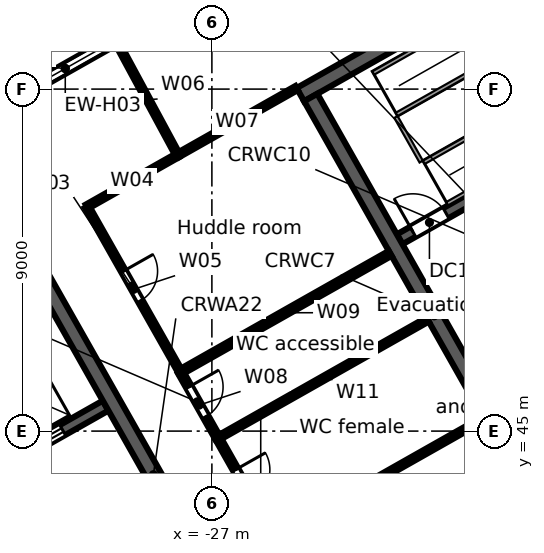
"""IFC4 building model, lengths in metres.
Left out: names, types, materials, properties, quantities, classifications, styles, units other than length and angle.
Written with IfcOpenShell. Run it as: python <this file> out.ifc"""

import sys

from ifc_helpers import new_model, si_unit, direction, frame, frame_2d, origin, place, context, subcontext, project, spatial, rectangle, extrude, element, fill, save


model = new_model("IFC4")
c1 = context("Model", 3, precision=1e-05, world=origin(), true_north=direction((0.0, 1.0)))
c2 = subcontext(c1, "Body", "Model", "MODEL_VIEW")
j1 = project(units=[si_unit("LENGTHUNIT", "METRE"), si_unit("PLANEANGLEUNIT", "RADIAN")], contexts=[c1])
p1 = place(None, origin())
s1 = spatial("IfcSite", under=j1, at=p1, CompositionType="ELEMENT")
p2 = place(p1, origin())
s2 = spatial("IfcBuilding", under=s1, at=p2, CompositionType="ELEMENT")
p3 = place(p2, frame((0.0, 0.0, 277.9)))
s3 = spatial("IfcBuildingStorey", under=s2, at=p3, CompositionType="ELEMENT", Elevation=277.9)
p4 = place(p3, frame((-58.732, 38.771, 0.0), z_axis=(0.0, 0.0, 1.0), x_axis=(0.870355615581, 0.492423702137, 0.0)))
e1 = element("IfcWall", 1, at=p4, inside=s3, PredefinedType="STANDARD", context=c2, shape_type="SweptSolid", body=[
    extrude(rectangle(XDim=64.052, YDim=0.25, at=frame_2d((32.026, 0.0))), origin(), (0.0, 0.0, 1.0), 3.52),
])
p5 = place(p4, frame((61.259, 0.0, 0.8)))
e2 = element("IfcOpeningElement", 2, at=p5, cuts=e1, PredefinedType="OPENING", context=c2, shape_type="SweptSolid", body=[
    extrude(rectangle(XDim=2.4, YDim=2.2, at=frame_2d((1.2, 1.1))), frame((0.0, 0.135, 0.0), z_axis=(0.0, -1.0, 0.0), x_axis=(1.0, 0.0, 0.0)), (0.0, 0.0, 1.0), 0.27),
])
p6 = place(p4, frame((58.216, 0.0, 0.8)))
e3 = element("IfcOpeningElement", 3, at=p6, cuts=e1, PredefinedType="OPENING", context=c2, shape_type="SweptSolid", body=[
    extrude(rectangle(XDim=2.4, YDim=2.2, at=frame_2d((1.2, 1.1))), frame((0.0, 0.135, 0.0), z_axis=(0.0, -1.0, 0.0), x_axis=(1.0, 0.0, 0.0)), (0.0, 0.0, 1.0), 0.27),
])
p7 = place(p4, frame((55.173, 0.0, 0.8)))
e4 = element("IfcOpeningElement", 4, at=p7, cuts=e1, PredefinedType="OPENING", context=c2, shape_type="SweptSolid", body=[
    extrude(rectangle(XDim=2.4, YDim=2.2, at=frame_2d((1.2, 1.1))), frame((0.0, 0.135, 0.0), z_axis=(0.0, -1.0, 0.0), x_axis=(1.0, 0.0, 0.0)), (0.0, 0.0, 1.0), 0.27),
])
p8 = place(p4, frame((52.129, 0.0, 0.8)))
e5 = element("IfcOpeningElement", 5, at=p8, cuts=e1, PredefinedType="OPENING", context=c2, shape_type="SweptSolid", body=[
    extrude(rectangle(XDim=2.4, YDim=2.2, at=frame_2d((1.2, 1.1))), frame((0.0, 0.135, 0.0), z_axis=(0.0, -1.0, 0.0), x_axis=(1.0, 0.0, 0.0)), (0.0, 0.0, 1.0), 0.27),
])
p9 = place(p4, frame((49.086, 0.0, 0.8)))
e6 = element("IfcOpeningElement", 6, at=p9, cuts=e1, PredefinedType="OPENING", context=c2, shape_type="SweptSolid", body=[
    extrude(rectangle(XDim=2.4, YDim=2.2, at=frame_2d((1.2, 1.1))), frame((0.0, 0.135, 0.0), z_axis=(0.0, -1.0, 0.0), x_axis=(1.0, 0.0, 0.0)), (0.0, 0.0, 1.0), 0.27),
])
p10 = place(p4, frame((46.043, 0.0, 0.8)))
e7 = element("IfcOpeningElement", 7, at=p10, cuts=e1, PredefinedType="OPENING", context=c2, shape_type="SweptSolid", body=[
    extrude(rectangle(XDim=2.4, YDim=2.2, at=frame_2d((1.2, 1.1))), frame((0.0, 0.135, 0.0), z_axis=(0.0, -1.0, 0.0), x_axis=(1.0, 0.0, 0.0)), (0.0, 0.0, 1.0), 0.27),
])
p11 = place(p4, frame((43.0, 0.0, 0.8)))
e8 = element("IfcOpeningElement", 8, at=p11, cuts=e1, PredefinedType="OPENING", context=c2, shape_type="SweptSolid", body=[
    extrude(rectangle(XDim=2.4, YDim=2.2, at=frame_2d((1.2, 1.1))), frame((0.0, 0.135, 0.0), z_axis=(0.0, -1.0, 0.0), x_axis=(1.0, 0.0, 0.0)), (0.0, 0.0, 1.0), 0.27),
])
p12 = place(p4, frame((39.956, 0.0, 0.8)))
e9 = element("IfcOpeningElement", 9, at=p12, cuts=e1, PredefinedType="OPENING", context=c2, shape_type="SweptSolid", body=[
    extrude(rectangle(XDim=2.4, YDim=2.2, at=frame_2d((1.2, 1.1))), frame((0.0, 0.135, 0.0), z_axis=(0.0, -1.0, 0.0), x_axis=(1.0, 0.0, 0.0)), (0.0, 0.0, 1.0), 0.27),
])
p13 = place(p4, frame((36.913, 0.0, 0.8)))
e10 = element("IfcOpeningElement", 10, at=p13, cuts=e1, PredefinedType="OPENING", context=c2, shape_type="SweptSolid", body=[
    extrude(rectangle(XDim=2.4, YDim=2.2, at=frame_2d((1.2, 1.1))), frame((0.0, 0.135, 0.0), z_axis=(0.0, -1.0, 0.0), x_axis=(1.0, 0.0, 0.0)), (0.0, 0.0, 1.0), 0.27),
])
p14 = place(p4, frame((33.87, 0.0, 0.8)))
e11 = element("IfcOpeningElement", 11, at=p14, cuts=e1, PredefinedType="OPENING", context=c2, shape_type="SweptSolid", body=[
    extrude(rectangle(XDim=2.4, YDim=2.2, at=frame_2d((1.2, 1.1))), frame((0.0, 0.135, 0.0), z_axis=(0.0, -1.0, 0.0), x_axis=(1.0, 0.0, 0.0)), (0.0, 0.0, 1.0), 0.27),
])
p15 = place(p4, frame((30.826, 0.0, 0.8)))
e12 = element("IfcOpeningElement", 12, at=p15, cuts=e1, PredefinedType="OPENING", context=c2, shape_type="SweptSolid", body=[
    extrude(rectangle(XDim=2.4, YDim=2.2, at=frame_2d((1.2, 1.1))), frame((0.0, 0.135, 0.0), z_axis=(0.0, -1.0, 0.0), x_axis=(1.0, 0.0, 0.0)), (0.0, 0.0, 1.0), 0.27),
])
p16 = place(p4, frame((27.783, 0.0, 0.8)))
e13 = element("IfcOpeningElement", 13, at=p16, cuts=e1, PredefinedType="OPENING", context=c2, shape_type="SweptSolid", body=[
    extrude(rectangle(XDim=2.4, YDim=2.2, at=frame_2d((1.2, 1.1))), frame((0.0, 0.135, 0.0), z_axis=(0.0, -1.0, 0.0), x_axis=(1.0, 0.0, 0.0)), (0.0, 0.0, 1.0), 0.27),
])
p17 = place(p4, frame((24.74, 0.0, 0.8)))
e14 = element("IfcOpeningElement", 14, at=p17, cuts=e1, PredefinedType="OPENING", context=c2, shape_type="SweptSolid", body=[
    extrude(rectangle(XDim=2.4, YDim=2.2, at=frame_2d((1.2, 1.1))), frame((0.0, 0.135, 0.0), z_axis=(0.0, -1.0, 0.0), x_axis=(1.0, 0.0, 0.0)), (0.0, 0.0, 1.0), 0.27),
])
p18 = place(p4, frame((21.696, 0.0, 0.8)))
e15 = element("IfcOpeningElement", 15, at=p18, cuts=e1, PredefinedType="OPENING", context=c2, shape_type="SweptSolid", body=[
    extrude(rectangle(XDim=2.4, YDim=2.2, at=frame_2d((1.2, 1.1))), frame((0.0, 0.135, 0.0), z_axis=(0.0, -1.0, 0.0), x_axis=(1.0, 0.0, 0.0)), (0.0, 0.0, 1.0), 0.27),
])
p19 = place(p4, frame((18.653, 0.0, 0.8)))
e16 = element("IfcOpeningElement", 16, at=p19, cuts=e1, PredefinedType="OPENING", context=c2, shape_type="SweptSolid", body=[
    extrude(rectangle(XDim=2.4, YDim=2.2, at=frame_2d((1.2, 1.1))), frame((0.0, 0.135, 0.0), z_axis=(0.0, -1.0, 0.0), x_axis=(1.0, 0.0, 0.0)), (0.0, 0.0, 1.0), 0.27),
])
p20 = place(p4, frame((15.61, 0.0, 0.8)))
e17 = element("IfcOpeningElement", 17, at=p20, cuts=e1, PredefinedType="OPENING", context=c2, shape_type="SweptSolid", body=[
    extrude(rectangle(XDim=2.4, YDim=2.2, at=frame_2d((1.2, 1.1))), frame((0.0, 0.135, 0.0), z_axis=(0.0, -1.0, 0.0), x_axis=(1.0, 0.0, 0.0)), (0.0, 0.0, 1.0), 0.27),
])
p21 = place(p4, frame((12.567, 0.0, 0.8)))
e18 = element("IfcOpeningElement", 18, at=p21, cuts=e1, PredefinedType="OPENING", context=c2, shape_type="SweptSolid", body=[
    extrude(rectangle(XDim=2.4, YDim=2.2, at=frame_2d((1.2, 1.1))), frame((0.0, 0.135, 0.0), z_axis=(0.0, -1.0, 0.0), x_axis=(1.0, 0.0, 0.0)), (0.0, 0.0, 1.0), 0.27),
])
p22 = place(p4, frame((9.523, 0.0, 0.8)))
e19 = element("IfcOpeningElement", 19, at=p22, cuts=e1, PredefinedType="OPENING", context=c2, shape_type="SweptSolid", body=[
    extrude(rectangle(XDim=2.4, YDim=2.2, at=frame_2d((1.2, 1.1))), frame((0.0, 0.135, 0.0), z_axis=(0.0, -1.0, 0.0), x_axis=(1.0, 0.0, 0.0)), (0.0, 0.0, 1.0), 0.27),
])
p23 = place(p4, frame((6.48, 0.0, 0.8)))
e20 = element("IfcOpeningElement", 20, at=p23, cuts=e1, PredefinedType="OPENING", context=c2, shape_type="SweptSolid", body=[
    extrude(rectangle(XDim=2.4, YDim=2.2, at=frame_2d((1.2, 1.1))), frame((0.0, 0.135, 0.0), z_axis=(0.0, -1.0, 0.0), x_axis=(1.0, 0.0, 0.0)), (0.0, 0.0, 1.0), 0.27),
])
p24 = place(p4, frame((3.437, 0.0, 0.8)))
e21 = element("IfcOpeningElement", 21, at=p24, cuts=e1, PredefinedType="OPENING", context=c2, shape_type="SweptSolid", body=[
    extrude(rectangle(XDim=2.4, YDim=2.2, at=frame_2d((1.2, 1.1))), frame((0.0, 0.135, 0.0), z_axis=(0.0, -1.0, 0.0), x_axis=(1.0, 0.0, 0.0)), (0.0, 0.0, 1.0), 0.27),
])
p25 = place(p4, frame((0.393, 0.0, 0.8)))
e22 = element("IfcOpeningElement", 22, at=p25, cuts=e1, PredefinedType="OPENING", context=c2, shape_type="SweptSolid", body=[
    extrude(rectangle(XDim=2.4, YDim=2.2, at=frame_2d((1.2, 1.1))), frame((0.0, 0.135, 0.0), z_axis=(0.0, -1.0, 0.0), x_axis=(1.0, 0.0, 0.0)), (0.0, 0.0, 1.0), 0.27),
])
p26 = place(p3, frame((-3.017, 46.293, 0.0), z_axis=(0.0, 0.0, 1.0), x_axis=(-0.870355474887, -0.492423950812, 0.0)))
e23 = element("IfcWall", 23, at=p26, inside=s3, PredefinedType="STANDARD", context=c2, shape_type="SweptSolid", body=[
    extrude(rectangle(XDim=40.34, YDim=0.25, at=frame_2d((20.17, 0.0))), origin(), (0.0, 0.0, 1.0), 3.52),
])
p27 = place(p26, frame((37.428, 0.0, 0.8)))
e24 = element("IfcOpeningElement", 24, at=p27, cuts=e23, PredefinedType="OPENING", context=c2, shape_type="SweptSolid", body=[
    extrude(rectangle(XDim=2.4, YDim=2.2, at=frame_2d((1.2, 1.1))), frame((0.0, 0.135, 0.0), z_axis=(0.0, -1.0, 0.0), x_axis=(1.0, 0.0, 0.0)), (0.0, 0.0, 1.0), 0.27),
])
p28 = place(p26, frame((34.372, 0.0, 0.0)))
e25 = element("IfcOpeningElement", 25, at=p28, cuts=e23, PredefinedType="OPENING", context=c2, shape_type="SweptSolid", body=[
    extrude(rectangle(XDim=1.8, YDim=2.4, at=frame_2d((0.9, 1.2))), frame((0.0, 0.135, 0.0), z_axis=(0.0, -1.0, 0.0), x_axis=(1.0, 0.0, 0.0)), (0.0, 0.0, 1.0), 0.27),
])
p29 = place(p26, frame((30.716, 0.0, 0.8)))
e26 = element("IfcOpeningElement", 26, at=p29, cuts=e23, PredefinedType="OPENING", context=c2, shape_type="SweptSolid", body=[
    extrude(rectangle(XDim=2.4, YDim=2.2, at=frame_2d((1.2, 1.1))), frame((0.0, 0.135, 0.0), z_axis=(0.0, -1.0, 0.0), x_axis=(1.0, 0.0, 0.0)), (0.0, 0.0, 1.0), 0.27),
])
p30 = place(p26, frame((27.36, 0.0, 0.8)))
e27 = element("IfcOpeningElement", 27, at=p30, cuts=e23, PredefinedType="OPENING", context=c2, shape_type="SweptSolid", body=[
    extrude(rectangle(XDim=2.4, YDim=2.2, at=frame_2d((1.2, 1.1))), frame((0.0, 0.135, 0.0), z_axis=(0.0, -1.0, 0.0), x_axis=(1.0, 0.0, 0.0)), (0.0, 0.0, 1.0), 0.27),
])
p31 = place(p26, frame((24.304, 0.0, 0.0)))
e28 = element("IfcOpeningElement", 28, at=p31, cuts=e23, PredefinedType="OPENING", context=c2, shape_type="SweptSolid", body=[
    extrude(rectangle(XDim=1.8, YDim=2.4, at=frame_2d((0.9, 1.2))), frame((0.0, 0.135, 0.0), z_axis=(0.0, -1.0, 0.0), x_axis=(1.0, 0.0, 0.0)), (0.0, 0.0, 1.0), 0.27),
])
p32 = place(p26, frame((20.648, 0.0, 0.8)))
e29 = element("IfcOpeningElement", 29, at=p32, cuts=e23, PredefinedType="OPENING", context=c2, shape_type="SweptSolid", body=[
    extrude(rectangle(XDim=2.4, YDim=2.2, at=frame_2d((1.2, 1.1))), frame((0.0, 0.135, 0.0), z_axis=(0.0, -1.0, 0.0), x_axis=(1.0, 0.0, 0.0)), (0.0, 0.0, 1.0), 0.27),
])
p33 = place(p26, frame((17.292, 0.0, 0.8)))
e30 = element("IfcOpeningElement", 30, at=p33, cuts=e23, PredefinedType="OPENING", context=c2, shape_type="SweptSolid", body=[
    extrude(rectangle(XDim=2.4, YDim=2.2, at=frame_2d((1.2, 1.1))), frame((0.0, 0.135, 0.0), z_axis=(0.0, -1.0, 0.0), x_axis=(1.0, 0.0, 0.0)), (0.0, 0.0, 1.0), 0.27),
])
p34 = place(p26, frame((14.236, 0.0, 0.0)))
e31 = element("IfcOpeningElement", 31, at=p34, cuts=e23, PredefinedType="OPENING", context=c2, shape_type="SweptSolid", body=[
    extrude(rectangle(XDim=1.8, YDim=2.4, at=frame_2d((0.9, 1.2))), frame((0.0, 0.135, 0.0), z_axis=(0.0, -1.0, 0.0), x_axis=(1.0, 0.0, 0.0)), (0.0, 0.0, 1.0), 0.27),
])
p35 = place(p26, frame((10.58, 0.0, 0.8)))
e32 = element("IfcOpeningElement", 32, at=p35, cuts=e23, PredefinedType="OPENING", context=c2, shape_type="SweptSolid", body=[
    extrude(rectangle(XDim=2.4, YDim=2.2, at=frame_2d((1.2, 1.1))), frame((0.0, 0.135, 0.0), z_axis=(0.0, -1.0, 0.0), x_axis=(1.0, 0.0, 0.0)), (0.0, 0.0, 1.0), 0.27),
])
p36 = place(p26, frame((7.224, 0.0, 0.8)))
e33 = element("IfcOpeningElement", 33, at=p36, cuts=e23, PredefinedType="OPENING", context=c2, shape_type="SweptSolid", body=[
    extrude(rectangle(XDim=2.4, YDim=2.2, at=frame_2d((1.2, 1.1))), frame((0.0, 0.135, 0.0), z_axis=(0.0, -1.0, 0.0), x_axis=(1.0, 0.0, 0.0)), (0.0, 0.0, 1.0), 0.27),
])
p37 = place(p26, frame((4.168, 0.0, 0.0)))
e34 = element("IfcOpeningElement", 34, at=p37, cuts=e23, PredefinedType="OPENING", context=c2, shape_type="SweptSolid", body=[
    extrude(rectangle(XDim=1.8, YDim=2.4, at=frame_2d((0.9, 1.2))), frame((0.0, 0.135, 0.0), z_axis=(0.0, -1.0, 0.0), x_axis=(1.0, 0.0, 0.0)), (0.0, 0.0, 1.0), 0.27),
])
p38 = place(p26, frame((0.512, 0.0, 0.8)))
e35 = element("IfcOpeningElement", 35, at=p38, cuts=e23, PredefinedType="OPENING", context=c2, shape_type="SweptSolid", body=[
    extrude(rectangle(XDim=2.4, YDim=2.2, at=frame_2d((1.2, 1.1))), frame((0.0, 0.135, 0.0), z_axis=(0.0, -1.0, 0.0), x_axis=(1.0, 0.0, 0.0)), (0.0, 0.0, 1.0), 0.27),
])
p39 = place(p3, frame((-37.282, 41.435, 0.0), z_axis=(0.0, 0.0, 1.0), x_axis=(0.870361315115, 0.492413628113, 0.0)))
e36 = element("IfcWall", 36, at=p39, inside=s3, PredefinedType="SOLIDWALL", context=c2, shape_type="SweptSolid", body=[
    extrude(rectangle(XDim=8.6, YDim=0.3, at=frame_2d((4.3, 0.0))), origin(), (0.0, 0.0, 1.0), 3.52),
])
p40 = place(p39, frame((0.65, 0.0, 0.0)))
e37 = element("IfcOpeningElement", 37, at=p40, cuts=e36, PredefinedType="OPENING", context=c2, shape_type="SweptSolid", body=[
    extrude(rectangle(XDim=1.1, YDim=2.1, at=frame_2d((0.55, 1.05))), frame((0.0, 0.16, 0.0), z_axis=(0.0, -1.0, 0.0), x_axis=(1.0, 0.0, 0.0)), (0.0, 0.0, 1.0), 0.32),
])
p41 = place(p39, frame((3.05, 0.0, 0.0)))
e38 = element("IfcOpeningElement", 38, at=p41, cuts=e36, PredefinedType="OPENING", context=c2, shape_type="SweptSolid", body=[
    extrude(rectangle(XDim=1.1, YDim=2.1, at=frame_2d((0.55, 1.05))), frame((0.0, 0.16, 0.0), z_axis=(0.0, -1.0, 0.0), x_axis=(1.0, 0.0, 0.0)), (0.0, 0.0, 1.0), 0.32),
])
p42 = place(p39, frame((6.2, 0.0, 0.0)))
e39 = element("IfcOpeningElement", 39, at=p42, cuts=e36, PredefinedType="OPENING", context=c2, shape_type="SweptSolid", body=[
    extrude(rectangle(XDim=1.1, YDim=2.1, at=frame_2d((0.55, 1.05))), frame((0.0, 0.16, 0.0), z_axis=(0.0, -1.0, 0.0), x_axis=(1.0, 0.0, 0.0)), (0.0, 0.0, 1.0), 0.32),
])
p43 = place(p3, frame((-31.79, 49.597, 0.0), z_axis=(0.0, 0.0, 1.0), x_axis=(0.492421663121, -0.870356769198, 0.0)))
e40 = element("IfcWall", 40, at=p43, inside=s3, PredefinedType="SOLIDWALL", context=c2, shape_type="SweptSolid", body=[
    extrude(rectangle(XDim=13.2, YDim=0.4, at=frame_2d((6.6, 0.0))), origin(), (0.0, 0.0, 1.0), 3.52),
])
p44 = place(p3, frame((-22.059, 50.047, 0.0), z_axis=(0.0, 0.0, 1.0), x_axis=(0.87035077051, 0.49243226567, 0.0)))
e41 = element("IfcWall", 41, at=p44, inside=s3, PredefinedType="SOLIDWALL", context=c2, shape_type="SweptSolid", body=[
    extrude(rectangle(XDim=7.4, YDim=0.3, at=frame_2d((3.7, 0.0))), origin(), (0.0, 0.0, 1.0), 3.52),
])
p45 = place(p44, frame((0.4, 0.0, 0.0)))
e42 = element("IfcOpeningElement", 42, at=p45, cuts=e41, PredefinedType="OPENING", context=c2, shape_type="SweptSolid", body=[
    extrude(rectangle(XDim=1.0, YDim=2.1, at=frame_2d((0.5, 1.05))), frame((0.0, 0.16, 0.0), z_axis=(0.0, -1.0, 0.0), x_axis=(1.0, 0.0, 0.0)), (0.0, 0.0, 1.0), 0.32),
])
p46 = place(p3, frame((-24.672, 53.854, 0.0), z_axis=(0.0, 0.0, 1.0), x_axis=(0.870353598469, 0.492427267353, 0.0)))
e43 = element("IfcWall", 43, at=p46, inside=s3, PredefinedType="SOLIDWALL", context=c2, shape_type="SweptSolid", body=[
    extrude(rectangle(XDim=15.0, YDim=0.4, at=frame_2d((7.5, 0.0))), origin(), (0.0, 0.0, 1.0), 3.52),
])
p47 = place(p3, frame((-24.4, 53.779, 0.0), z_axis=(0.0, 0.0, 1.0), x_axis=(0.492421663121, -0.870356769198, 0.0)))
e44 = element("IfcWall", 44, at=p47, inside=s3, PredefinedType="SOLIDWALL", context=c2, shape_type="SweptSolid", body=[
    extrude(rectangle(XDim=13.2, YDim=0.4, at=frame_2d((6.6, 0.0))), origin(), (0.0, 0.0, 1.0), 3.52),
])
p48 = place(p3, frame((-30.289, 50.906, 0.0), z_axis=(0.0, 0.0, 1.0), x_axis=(0.870344460795, 0.492443417626, 0.0)))
e45 = element("IfcWall", 45, at=p48, inside=s3, PredefinedType="PARTITIONING", context=c2, shape_type="SweptSolid", body=[
    extrude(rectangle(XDim=2.75, YDim=0.125, at=frame_2d((1.375, 0.0))), origin(), (0.0, 0.0, 1.0), 3.52),
])
p49 = place(p3, frame((-30.289, 50.906, 0.0), z_axis=(0.0, 0.0, 1.0), x_axis=(0.492406341242, -0.870365437678, 0.0)))
e46 = element("IfcWall", 46, at=p49, inside=s3, PredefinedType="PARTITIONING", context=c2, shape_type="SweptSolid", body=[
    extrude(rectangle(XDim=5.0, YDim=0.125, at=frame_2d((2.5, 0.0))), origin(), (0.0, 0.0, 1.0), 3.52),
])
p50 = place(p49, frame((1.95, 0.0, 0.0)))
e47 = element("IfcOpeningElement", 47, at=p50, cuts=e46, PredefinedType="OPENING", context=c2, shape_type="SweptSolid", body=[
    extrude(rectangle(XDim=0.9, YDim=2.1, at=frame_2d((0.45, 1.05))), frame((0.0, 0.073, 0.0), z_axis=(0.0, -1.0, 0.0), x_axis=(1.0, 0.0, 0.0)), (0.0, 0.0, 1.0), 0.145),
])
p51 = place(p3, frame((-29.474, 55.181, 0.0), z_axis=(0.0, 0.0, 1.0), x_axis=(0.475344759365, -0.879799613403, 0.0)))
e48 = element("IfcWall", 48, at=p51, inside=s3, PredefinedType="PARTITIONING", context=c2, shape_type="SweptSolid", body=[
    extrude(rectangle(XDim=3.32, YDim=0.125, at=frame_2d((1.66, 0.0))), origin(), (0.0, 0.0, 1.0), 2.888),
])
p52 = place(p3, frame((-27.896, 52.26, 0.0), z_axis=(0.0, 0.0, 1.0), x_axis=(0.870352535776, 0.492429145632, 0.0)))
e49 = element("IfcWall", 49, at=p52, inside=s3, PredefinedType="PARTITIONING", context=c2, shape_type="SweptSolid", body=[
    extrude(rectangle(XDim=3.591, YDim=0.125, at=frame_2d((1.795, 0.0))), origin(), (0.0, 0.0, 1.0), 2.792),
])
p53 = place(p3, frame((-27.827, 46.554, 0.0), z_axis=(0.0, 0.0, 1.0), x_axis=(0.492374954878, -0.870383193662, 0.0)))
e50 = element("IfcWall", 50, at=p53, inside=s3, PredefinedType="PARTITIONING", context=c2, shape_type="SweptSolid", body=[
    extrude(rectangle(XDim=2.0, YDim=0.15, at=frame_2d((1.0, 0.0))), origin(), (0.0, 0.0, 1.0), 2.792),
])
p54 = place(p53, frame((0.45, 0.0, 0.0)))
e51 = element("IfcOpeningElement", 51, at=p54, cuts=e50, PredefinedType="OPENING", context=c2, shape_type="SweptSolid", body=[
    extrude(rectangle(XDim=0.9, YDim=2.1, at=frame_2d((0.45, 1.05))), frame((0.0, 0.085, 0.0), z_axis=(0.0, -1.0, 0.0), x_axis=(1.0, 0.0, 0.0)), (0.0, 0.0, 1.0), 0.17),
])
p55 = place(p3, frame((-27.827, 46.554, 0.0), z_axis=(0.0, 0.0, 1.0), x_axis=(0.870339695563, 0.492451839602, 0.0)))
e52 = element("IfcWall", 52, at=p55, inside=s3, PredefinedType="PARTITIONING", context=c2, shape_type="SweptSolid", body=[
    extrude(rectangle(XDim=6.34, YDim=0.15, at=frame_2d((3.17, 0.0))), origin(), (0.0, 0.0, 1.0), 2.792),
])
p56 = place(p3, frame((-26.842, 44.813, 0.0), z_axis=(0.0, 0.0, 1.0), x_axis=(0.492365617434, -0.870388475779, 0.0)))
e53 = element("IfcWall", 53, at=p56, inside=s3, PredefinedType="PARTITIONING", context=c2, shape_type="SweptSolid", body=[
    extrude(rectangle(XDim=3.0, YDim=0.15, at=frame_2d((1.5, 0.0))), origin(), (0.0, 0.0, 1.0), 2.792),
])
p57 = place(p56, frame((0.95, 0.0, 0.0)))
e54 = element("IfcOpeningElement", 54, at=p57, cuts=e53, PredefinedType="OPENING", context=c2, shape_type="SweptSolid", body=[
    extrude(rectangle(XDim=0.9, YDim=2.1, at=frame_2d((0.45, 1.05))), frame((0.0, 0.085, 0.0), z_axis=(0.0, -1.0, 0.0), x_axis=(1.0, 0.0, 0.0)), (0.0, 0.0, 1.0), 0.17),
])
p58 = place(p3, frame((-26.842, 44.813, 0.0), z_axis=(0.0, 0.0, 1.0), x_axis=(0.870283015025, 0.492552001071, 0.0)))
e55 = element("IfcWall", 55, at=p58, inside=s3, PredefinedType="PARTITIONING", context=c2, shape_type="SweptSolid", body=[
    extrude(rectangle(XDim=6.341, YDim=0.125, at=frame_2d((3.17, 0.0))), origin(), (0.0, 0.0, 1.0), 2.792),
])
p59 = place(p3, frame((-25.365, 42.202, 0.0), z_axis=(0.0, 0.0, 1.0), x_axis=(0.870320373616, 0.492485986875, 0.0)))
e56 = element("IfcWall", 56, at=p59, inside=s3, PredefinedType="PARTITIONING", context=c2, shape_type="SweptSolid", body=[
    extrude(rectangle(XDim=6.341, YDim=0.125, at=frame_2d((3.171, 0.0))), origin(), (0.0, 0.0, 1.0), 3.52),
])
p60 = place(p15, origin())
e57 = element("IfcWindow", 57, at=p60, inside=s3, PartitioningType="SINGLE_PANEL", PredefinedType="WINDOW", context=c2, shape_type="SweptSolid", body=[
    extrude(rectangle(XDim=2.4, YDim=2.2, at=frame_2d((1.2, 1.1))), frame((0.0, 0.03, 0.0), z_axis=(0.0, -1.0, 0.0), x_axis=(1.0, 0.0, 0.0)), (0.0, 0.0, 1.0), 0.06),
])
fill(e12, e57)
p61 = place(p42, origin())
e58 = element("IfcDoor", 58, at=p61, inside=s3, OperationType="DOUBLE_DOOR_SLIDING", PredefinedType="DOOR", context=c2, shape_type="SweptSolid", body=[
    extrude(rectangle(XDim=1.1, YDim=2.1, at=frame_2d((0.55, 1.05))), frame((0.0, 0.025, 0.0), z_axis=(0.0, -1.0, 0.0), x_axis=(1.0, 0.0, 0.0)), (0.0, 0.0, 1.0), 0.05),
])
fill(e39, e58)
p62 = place(p45, origin())
e59 = element("IfcDoor", 59, at=p62, inside=s3, OperationType="SINGLE_SWING_LEFT", PredefinedType="DOOR", context=c2, shape_type="SweptSolid", body=[
    extrude(rectangle(XDim=1.0, YDim=2.1, at=frame_2d((0.5, 1.05))), frame((0.0, 0.025, 0.0), z_axis=(0.0, -1.0, 0.0), x_axis=(1.0, 0.0, 0.0)), (0.0, 0.0, 1.0), 0.05),
])
fill(e42, e59)
p63 = place(p50, origin())
e60 = element("IfcDoor", 60, at=p63, inside=s3, OperationType="SINGLE_SWING_LEFT", PredefinedType="DOOR", context=c2, shape_type="SweptSolid", body=[
    extrude(rectangle(XDim=0.9, YDim=2.1, at=frame_2d((0.45, 1.05))), frame((0.0, 0.025, 0.0), z_axis=(0.0, -1.0, 0.0), x_axis=(1.0, 0.0, 0.0)), (0.0, 0.0, 1.0), 0.05),
])
fill(e47, e60)
p64 = place(p57, origin())
e61 = element("IfcDoor", 61, at=p64, inside=s3, OperationType="SINGLE_SWING_LEFT", PredefinedType="DOOR", context=c2, shape_type="SweptSolid", body=[
    extrude(rectangle(XDim=0.9, YDim=2.1, at=frame_2d((0.45, 1.05))), frame((0.0, 0.025, 0.0), z_axis=(0.0, -1.0, 0.0), x_axis=(1.0, 0.0, 0.0)), (0.0, 0.0, 1.0), 0.05),
])
fill(e54, e61)
p65 = place(p54, origin())
e62 = element("IfcDoor", 62, at=p65, inside=s3, OperationType="SINGLE_SWING_LEFT", PredefinedType="DOOR", context=c2, shape_type="SweptSolid", body=[
    extrude(rectangle(XDim=0.9, YDim=2.1, at=frame_2d((0.45, 1.05))), frame((0.0, 0.025, 0.0), z_axis=(0.0, -1.0, 0.0), x_axis=(1.0, 0.0, 0.0)), (0.0, 0.0, 1.0), 0.05),
])
fill(e51, e62)
save(model, sys.argv[1])
